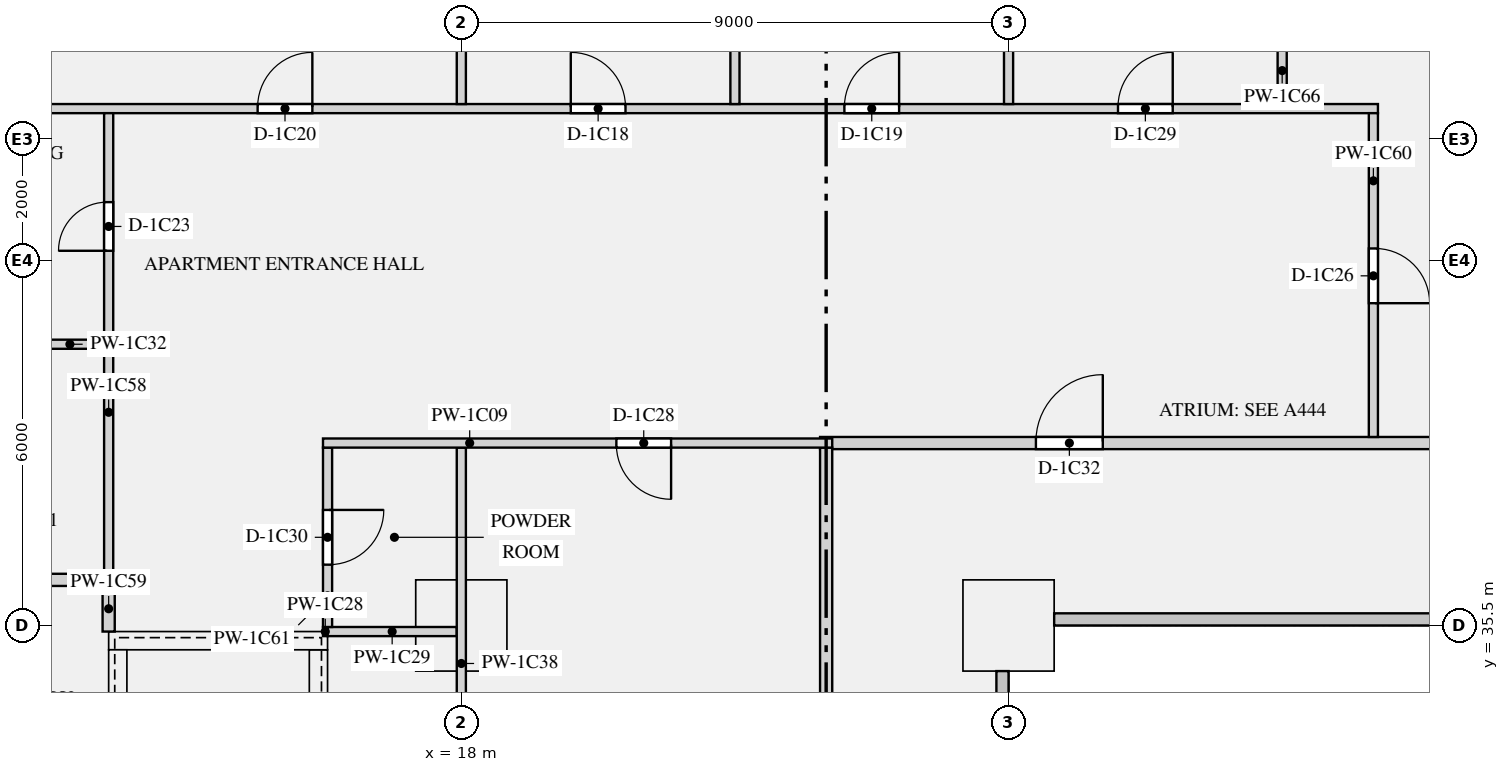
"""IFC4 building model, lengths in metres.
Left out: names, types, materials, properties, quantities, classifications, styles, units other than length and angle.
Written with IfcOpenShell. Run it as: python <this file> out.ifc"""

import sys

from ifc_helpers import new_model, si_unit, direction, frame, frame_2d, origin, origin_2d, place, context, subcontext, project, spatial, rectangle, extrude, element, fill, save


model = new_model("IFC4")
c1 = context("Model", 3, precision=1e-05, world=origin(), true_north=direction((0.0, 1.0)))
c2 = subcontext(c1, "Body", "Model", "MODEL_VIEW")
j1 = project(units=[si_unit("LENGTHUNIT", "METRE"), si_unit("PLANEANGLEUNIT", "RADIAN")], contexts=[c1])
p1 = place(None, origin())
s1 = spatial("IfcSite", under=j1, at=p1, CompositionType="ELEMENT")
p2 = place(p1, origin())
s2 = spatial("IfcBuilding", under=s1, at=p2, CompositionType="ELEMENT")
p3 = place(p2, frame((0.0, 0.0, 38.4)))
s3 = spatial("IfcBuildingStorey", under=s2, at=p3, CompositionType="ELEMENT", Elevation=38.4)
for number, where, z_axis, x_axis in (
    (1, (18.0, 35.5, 0.0), (0.0, 0.0, 1.0), (1.0, 0.0, 0.0)),
    (2, (27.0, 35.5, 0.0), (0.0, 0.0, 1.0), (1.0, 0.0, 0.0)),
):
    element("IfcColumn", number, at=place(p3, frame(where, z_axis=z_axis, x_axis=x_axis)), inside=s3, PredefinedType="COLUMN", context=c2, shape_type="SweptSolid", body=[
        extrude(rectangle(XDim=1.5, YDim=1.5, at=origin_2d()), origin(), (0.0, 0.0, 1.0), 3.15),
    ])
p4 = place(p3, frame((12.2, 35.25, 0.0), z_axis=(0.0, 0.0, 1.0), x_axis=(1.0, 0.0, 0.0)))
e3 = element("IfcWall", 3, at=p4, inside=s3, PredefinedType="SHEAR", context=c2, shape_type="SweptSolid", body=[
    extrude(rectangle(XDim=3.6, YDim=0.3, at=frame_2d((1.8, 0.0))), origin(), (0.0, 0.0, 1.0), 3.15),
])
for number, where, z_axis, x_axis in (
    (4, (12.35, 27.3, 0.0), (0.0, 0.0, 1.0), (0.0, 1.0, 0.0)),
    (5, (15.65, 27.3, 0.0), (0.0, 0.0, 1.0), (0.0, 1.0, 0.0)),
):
    element("IfcWall", number, at=place(p3, frame(where, z_axis=z_axis, x_axis=x_axis)), inside=s3, PredefinedType="SHEAR", context=c2, shape_type="SweptSolid", body=[
        extrude(rectangle(XDim=7.8, YDim=0.3, at=frame_2d((3.9, 0.0))), origin(), (0.0, 0.0, 1.0), 3.15),
    ])
p5 = place(p3, frame((15.725, 38.5, 0.0), z_axis=(0.0, 0.0, 1.0), x_axis=(1.0, 0.0, 0.0)))
e6 = element("IfcWall", 6, at=p5, inside=s3, PredefinedType="PARTITIONING", context=c2, shape_type="SweptSolid", body=[
    extrude(rectangle(XDim=8.375, YDim=0.15, at=frame_2d((4.188, 0.0))), origin(), (0.0, 0.0, 1.0), 2.83),
])
p6 = place(p5, frame((4.825, 0.0, 0.0)))
e7 = element("IfcOpeningElement", 7, at=p6, cuts=e6, PredefinedType="OPENING", context=c2, shape_type="SweptSolid", body=[
    extrude(rectangle(XDim=0.9, YDim=2.1, at=frame_2d((0.45, 1.05))), frame((0.0, 0.085, 0.0), z_axis=(0.0, -1.0, 0.0), x_axis=(1.0, 0.0, 0.0)), (0.0, 0.0, 1.0), 0.17),
])
p7 = place(p3, frame((23.9, 38.5, 0.0), z_axis=(0.0, 0.0, 1.0), x_axis=(1.0, 0.0, 0.0)))
e8 = element("IfcWall", 8, at=p7, inside=s3, PredefinedType="PARTITIONING", context=c2, shape_type="SweptSolid", body=[
    extrude(rectangle(XDim=24.2, YDim=0.2, at=frame_2d((12.1, 0.0))), origin(), (0.0, 0.0, 1.0), 2.83),
])
p8 = place(p7, frame((3.55, 0.0, 0.0)))
e9 = element("IfcOpeningElement", 9, at=p8, cuts=e8, PredefinedType="OPENING", context=c2, shape_type="SweptSolid", body=[
    extrude(rectangle(XDim=1.1, YDim=2.1, at=frame_2d((0.55, 1.05))), frame((0.0, 0.11, 0.0), z_axis=(0.0, -1.0, 0.0), x_axis=(1.0, 0.0, 0.0)), (0.0, 0.0, 1.0), 0.22),
])
p9 = place(p3, frame((0.8, 36.25, 0.0), z_axis=(0.0, 0.0, 1.0), x_axis=(1.0, 0.0, 0.0)))
e10 = element("IfcWall", 10, at=p9, inside=s3, PredefinedType="PARTITIONING", context=c2, shape_type="SweptSolid", body=[
    extrude(rectangle(XDim=11.475, YDim=0.2, at=frame_2d((5.737, 0.0))), origin(), (0.0, 0.0, 1.0), 2.83),
])
p10 = place(p3, frame((5.3, 44.0, 0.0), z_axis=(0.0, 0.0, 1.0), x_axis=(1.0, 0.0, 0.0)))
e11 = element("IfcWall", 11, at=p10, inside=s3, PredefinedType="PARTITIONING", context=c2, shape_type="SweptSolid", body=[
    extrude(rectangle(XDim=27.775, YDim=0.15, at=frame_2d((13.887, 0.0))), origin(), (0.0, 0.0, 1.0), 2.83),
])
p11 = place(p10, frame((14.5, 0.0, 0.0)))
e12 = element("IfcOpeningElement", 12, at=p11, cuts=e11, PredefinedType="OPENING", context=c2, shape_type="SweptSolid", body=[
    extrude(rectangle(XDim=0.9, YDim=2.1, at=frame_2d((0.45, 1.05))), frame((0.0, 0.085, 0.0), z_axis=(0.0, -1.0, 0.0), x_axis=(1.0, 0.0, 0.0)), (0.0, 0.0, 1.0), 0.17),
])
p12 = place(p10, frame((19.0, 0.0, 0.0)))
e13 = element("IfcOpeningElement", 13, at=p12, cuts=e11, PredefinedType="OPENING", context=c2, shape_type="SweptSolid", body=[
    extrude(rectangle(XDim=0.9, YDim=2.1, at=frame_2d((0.45, 1.05))), frame((0.0, 0.085, 0.0), z_axis=(0.0, -1.0, 0.0), x_axis=(1.0, 0.0, 0.0)), (0.0, 0.0, 1.0), 0.17),
])
p13 = place(p10, frame((9.35, 0.0, 0.0)))
e14 = element("IfcOpeningElement", 14, at=p13, cuts=e11, PredefinedType="OPENING", context=c2, shape_type="SweptSolid", body=[
    extrude(rectangle(XDim=0.9, YDim=2.1, at=frame_2d((0.45, 1.05))), frame((0.0, 0.085, 0.0), z_axis=(0.0, -1.0, 0.0), x_axis=(1.0, 0.0, 0.0)), (0.0, 0.0, 1.0), 0.17),
])
p14 = place(p10, frame((23.5, 0.0, 0.0)))
e15 = element("IfcOpeningElement", 15, at=p14, cuts=e11, PredefinedType="OPENING", context=c2, shape_type="SweptSolid", body=[
    extrude(rectangle(XDim=0.9, YDim=2.1, at=frame_2d((0.45, 1.05))), frame((0.0, 0.085, 0.0), z_axis=(0.0, -1.0, 0.0), x_axis=(1.0, 0.0, 0.0)), (0.0, 0.0, 1.0), 0.17),
])
p15 = place(p3, frame((15.725, 35.4, 0.0), z_axis=(0.0, 0.0, 1.0), x_axis=(1.0, 0.0, 0.0)))
e16 = element("IfcWall", 16, at=p15, inside=s3, PredefinedType="PARTITIONING", context=c2, shape_type="SweptSolid", body=[
    extrude(rectangle(XDim=0.075, YDim=0.15, at=frame_2d((0.038, 0.0))), origin(), (0.0, 0.0, 1.0), 2.83),
])
p16 = place(p3, frame((15.8, 35.4, 0.0), z_axis=(0.0, 0.0, 1.0), x_axis=(1.0, 0.0, 0.0)))
e17 = element("IfcWall", 17, at=p16, inside=s3, PredefinedType="PARTITIONING", context=c2, shape_type="SweptSolid", body=[
    extrude(rectangle(XDim=2.125, YDim=0.15, at=frame_2d((1.062, 0.0))), origin(), (0.0, 0.0, 1.0), 2.83),
])
p17 = place(p3, frame((9.075, 40.125, 0.0), z_axis=(0.0, 0.0, 1.0), x_axis=(1.0, 0.0, 0.0)))
e18 = element("IfcWall", 18, at=p17, inside=s3, PredefinedType="PARTITIONING", context=c2, shape_type="SweptSolid", body=[
    extrude(rectangle(XDim=3.05, YDim=0.15, at=frame_2d((1.525, 0.0))), origin(), (0.0, 0.0, 1.0), 2.83),
])
p18 = place(p17, frame((1.125, 0.0, 0.0)))
e19 = element("IfcOpeningElement", 19, at=p18, cuts=e18, PredefinedType="OPENING", context=c2, shape_type="SweptSolid", body=[
    extrude(rectangle(XDim=0.8, YDim=2.1, at=frame_2d((0.4, 1.05))), frame((0.0, 0.085, 0.0), z_axis=(0.0, -1.0, 0.0), x_axis=(1.0, 0.0, 0.0)), (0.0, 0.0, 1.0), 0.17),
])
p19 = place(p3, frame((18.0, 27.1, 0.0), z_axis=(0.0, 0.0, 1.0), x_axis=(0.0, 1.0, 0.0)))
e20 = element("IfcWall", 20, at=p19, inside=s3, PredefinedType="PARTITIONING", context=c2, shape_type="SweptSolid", body=[
    extrude(rectangle(XDim=11.325, YDim=0.15, at=frame_2d((5.663, 0.0))), origin(), (0.0, 0.0, 1.0), 2.83),
])
p20 = place(p19, frame((3.325, 0.0, 0.0)))
e21 = element("IfcOpeningElement", 21, at=p20, cuts=e20, PredefinedType="OPENING", context=c2, shape_type="SweptSolid", body=[
    extrude(rectangle(XDim=0.9, YDim=2.1, at=frame_2d((0.45, 1.05))), frame((0.0, 0.085, 0.0), z_axis=(0.0, -1.0, 0.0), x_axis=(1.0, 0.0, 0.0)), (0.0, 0.0, 1.0), 0.17),
])
p21 = place(p3, frame((18.0, 44.075, 0.0), z_axis=(0.0, 0.0, 1.0), x_axis=(0.0, 1.0, 0.0)))
e22 = element("IfcWall", 22, at=p21, inside=s3, PredefinedType="PARTITIONING", context=c2, shape_type="SweptSolid", body=[
    extrude(rectangle(XDim=3.625, YDim=0.15, at=frame_2d((1.812, 0.0))), origin(), (0.0, 0.0, 1.0), 2.83),
])
p22 = place(p3, frame((24.0, 27.1, 0.0), z_axis=(0.0, 0.0, 1.0), x_axis=(0.0, 1.0, 0.0)))
e23 = element("IfcWall", 23, at=p22, inside=s3, PredefinedType="PARTITIONING", context=c2, shape_type="SweptSolid", body=[
    extrude(rectangle(XDim=11.325, YDim=0.2, at=frame_2d((5.663, 0.0))), origin(), (0.0, 0.0, 1.0), 2.83),
])
p23 = place(p3, frame((12.2, 36.35, 0.0), z_axis=(0.0, 0.0, 1.0), x_axis=(0.0, 1.0, 0.0)))
e24 = element("IfcWall", 24, at=p23, inside=s3, PredefinedType="PARTITIONING", context=c2, shape_type="SweptSolid", body=[
    extrude(rectangle(XDim=7.575, YDim=0.15, at=frame_2d((3.788, 0.0))), origin(), (0.0, 0.0, 1.0), 2.83),
])
p24 = place(p23, frame((5.312, 0.0, 0.0)))
e25 = element("IfcOpeningElement", 25, at=p24, cuts=e24, PredefinedType="OPENING", context=c2, shape_type="SweptSolid", body=[
    extrude(rectangle(XDim=0.8, YDim=2.1, at=frame_2d((0.4, 1.05))), frame((0.0, 0.085, 0.0), z_axis=(0.0, -1.0, 0.0), x_axis=(1.0, 0.0, 0.0)), (0.0, 0.0, 1.0), 0.17),
])
p25 = place(p3, frame((12.2, 35.4, 0.0), z_axis=(0.0, 0.0, 1.0), x_axis=(0.0, 1.0, 0.0)))
e26 = element("IfcWall", 26, at=p25, inside=s3, PredefinedType="PARTITIONING", context=c2, shape_type="SweptSolid", body=[
    extrude(rectangle(XDim=0.75, YDim=0.2, at=frame_2d((0.375, 0.0))), origin(), (0.0, 0.0, 1.0), 2.83),
])
p26 = place(p3, frame((33.0, 38.6, 0.0), z_axis=(0.0, 0.0, 1.0), x_axis=(0.0, 1.0, 0.0)))
e27 = element("IfcWall", 27, at=p26, inside=s3, PredefinedType="PARTITIONING", context=c2, shape_type="SweptSolid", body=[
    extrude(rectangle(XDim=5.325, YDim=0.15, at=frame_2d((2.663, 0.0))), origin(), (0.0, 0.0, 1.0), 2.83),
])
p27 = place(p26, frame((2.2, 0.0, 0.0)))
e28 = element("IfcOpeningElement", 28, at=p27, cuts=e27, PredefinedType="OPENING", context=c2, shape_type="SweptSolid", body=[
    extrude(rectangle(XDim=0.9, YDim=2.1, at=frame_2d((0.45, 1.05))), frame((0.0, 0.085, 0.0), z_axis=(0.0, -1.0, 0.0), x_axis=(1.0, 0.0, 0.0)), (0.0, 0.0, 1.0), 0.17),
])
p28 = place(p3, frame((15.8, 35.475, 0.0), z_axis=(0.0, 0.0, 1.0), x_axis=(0.0, 1.0, 0.0)))
e29 = element("IfcWall", 29, at=p28, inside=s3, PredefinedType="PARTITIONING", context=c2, shape_type="SweptSolid", body=[
    extrude(rectangle(XDim=2.95, YDim=0.15, at=frame_2d((1.475, 0.0))), origin(), (0.0, 0.0, 1.0), 2.83),
])
p29 = place(p28, frame((1.025, 0.0, 0.0)))
e30 = element("IfcOpeningElement", 30, at=p29, cuts=e29, PredefinedType="OPENING", context=c2, shape_type="SweptSolid", body=[
    extrude(rectangle(XDim=0.9, YDim=2.1, at=frame_2d((0.45, 1.05))), frame((0.0, 0.085, 0.0), z_axis=(0.0, -1.0, 0.0), x_axis=(1.0, 0.0, 0.0)), (0.0, 0.0, 1.0), 0.17),
])
for number, where, z_axis, x_axis in (
    (31, (22.5, 44.075, 0.0), (0.0, 0.0, 1.0), (0.0, 1.0, 0.0)),
    (32, (27.0, 44.075, 0.0), (0.0, 0.0, 1.0), (0.0, 1.0, 0.0)),
):
    element("IfcWall", number, at=place(p3, frame(where, z_axis=z_axis, x_axis=x_axis)), inside=s3, PredefinedType="PARTITIONING", context=c2, shape_type="SweptSolid", body=[
        extrude(rectangle(XDim=3.625, YDim=0.15, at=frame_2d((1.812, 0.0))), origin(), (0.0, 0.0, 1.0), 2.83),
    ])
p30 = place(p3, frame((31.5, 44.075, 0.0), z_axis=(0.0, 0.0, 1.0), x_axis=(0.0, 1.0, 0.0)))
e33 = element("IfcWall", 33, at=p30, inside=s3, PredefinedType="PARTITIONING", context=c2, shape_type="SweptSolid", body=[
    extrude(rectangle(XDim=3.625, YDim=0.15, at=frame_2d((1.812, 0.0))), origin(), (0.0, 0.0, 1.0), 2.83),
])
p31 = place(p30, frame((1.1, 0.0, 0.0)))
e34 = element("IfcOpeningElement", 34, at=p31, cuts=e33, PredefinedType="OPENING", context=c2, shape_type="SweptSolid", body=[
    extrude(rectangle(XDim=1.5, YDim=2.1, at=frame_2d((0.75, 1.05))), frame((0.0, 0.085, 0.0), z_axis=(0.0, -1.0, 0.0), x_axis=(1.0, 0.0, 0.0)), (0.0, 0.0, 1.0), 0.17),
])
p32 = place(p11, origin())
e35 = element("IfcDoor", 35, at=p32, inside=s3, OperationType="SINGLE_SWING_LEFT", PredefinedType="DOOR", context=c2, shape_type="SweptSolid", body=[
    extrude(rectangle(XDim=0.9, YDim=2.1, at=frame_2d((0.45, 1.05))), frame((0.0, 0.025, 0.0), z_axis=(0.0, -1.0, 0.0), x_axis=(1.0, 0.0, 0.0)), (0.0, 0.0, 1.0), 0.05),
])
fill(e12, e35)
p33 = place(p12, origin())
e36 = element("IfcDoor", 36, at=p33, inside=s3, OperationType="SINGLE_SWING_RIGHT", PredefinedType="DOOR", context=c2, shape_type="SweptSolid", body=[
    extrude(rectangle(XDim=0.9, YDim=2.1, at=frame_2d((0.45, 1.05))), frame((0.0, 0.025, 0.0), z_axis=(0.0, -1.0, 0.0), x_axis=(1.0, 0.0, 0.0)), (0.0, 0.0, 1.0), 0.05),
])
fill(e13, e36)
p34 = place(p13, origin())
e37 = element("IfcDoor", 37, at=p34, inside=s3, OperationType="SINGLE_SWING_RIGHT", PredefinedType="DOOR", context=c2, shape_type="SweptSolid", body=[
    extrude(rectangle(XDim=0.9, YDim=2.1, at=frame_2d((0.45, 1.05))), frame((0.0, 0.025, 0.0), z_axis=(0.0, -1.0, 0.0), x_axis=(1.0, 0.0, 0.0)), (0.0, 0.0, 1.0), 0.05),
])
fill(e14, e37)
p35 = place(p24, origin())
e38 = element("IfcDoor", 38, at=p35, inside=s3, OperationType="SINGLE_SWING_LEFT", PredefinedType="DOOR", context=c2, shape_type="SweptSolid", body=[
    extrude(rectangle(XDim=0.8, YDim=2.1, at=frame_2d((0.4, 1.05))), frame((0.0, 0.025, 0.0), z_axis=(0.0, -1.0, 0.0), x_axis=(1.0, 0.0, 0.0)), (0.0, 0.0, 1.0), 0.05),
])
fill(e25, e38)
p36 = place(p27, frame((0.9, 0.0, 0.0), z_axis=(0.0, 0.0, 1.0), x_axis=(-1.0, 0.0, 0.0)))
e39 = element("IfcDoor", 39, at=p36, inside=s3, OperationType="SINGLE_SWING_RIGHT", PredefinedType="DOOR", context=c2, shape_type="SweptSolid", body=[
    extrude(rectangle(XDim=0.9, YDim=2.1, at=frame_2d((0.45, 1.05))), frame((0.0, 0.025, 0.0), z_axis=(0.0, -1.0, 0.0), x_axis=(1.0, 0.0, 0.0)), (0.0, 0.0, 1.0), 0.05),
])
fill(e28, e39)
p37 = place(p6, frame((0.9, 0.0, 0.0), z_axis=(0.0, 0.0, 1.0), x_axis=(-1.0, 0.0, 0.0)))
e40 = element("IfcDoor", 40, at=p37, inside=s3, OperationType="SINGLE_SWING_LEFT", PredefinedType="DOOR", context=c2, shape_type="SweptSolid", body=[
    extrude(rectangle(XDim=0.9, YDim=2.1, at=frame_2d((0.45, 1.05))), frame((0.0, 0.025, 0.0), z_axis=(0.0, -1.0, 0.0), x_axis=(1.0, 0.0, 0.0)), (0.0, 0.0, 1.0), 0.05),
])
fill(e7, e40)
p38 = place(p14, origin())
e41 = element("IfcDoor", 41, at=p38, inside=s3, OperationType="SINGLE_SWING_RIGHT", PredefinedType="DOOR", context=c2, shape_type="SweptSolid", body=[
    extrude(rectangle(XDim=0.9, YDim=2.1, at=frame_2d((0.45, 1.05))), frame((0.0, 0.025, 0.0), z_axis=(0.0, -1.0, 0.0), x_axis=(1.0, 0.0, 0.0)), (0.0, 0.0, 1.0), 0.05),
])
fill(e15, e41)
p39 = place(p29, frame((0.9, 0.0, 0.0), z_axis=(0.0, 0.0, 1.0), x_axis=(-1.0, 0.0, 0.0)))
e42 = element("IfcDoor", 42, at=p39, inside=s3, OperationType="SINGLE_SWING_LEFT", PredefinedType="DOOR", context=c2, shape_type="SweptSolid", body=[
    extrude(rectangle(XDim=0.9, YDim=2.1, at=frame_2d((0.45, 1.05))), frame((0.0, 0.025, 0.0), z_axis=(0.0, -1.0, 0.0), x_axis=(1.0, 0.0, 0.0)), (0.0, 0.0, 1.0), 0.05),
])
fill(e30, e42)
p40 = place(p8, origin())
e43 = element("IfcDoor", 43, at=p40, inside=s3, OperationType="SINGLE_SWING_RIGHT", PredefinedType="DOOR", context=c2, shape_type="SweptSolid", body=[
    extrude(rectangle(XDim=1.1, YDim=2.1, at=frame_2d((0.55, 1.05))), frame((0.0, 0.025, 0.0), z_axis=(0.0, -1.0, 0.0), x_axis=(1.0, 0.0, 0.0)), (0.0, 0.0, 1.0), 0.05),
])
fill(e9, e43)
save(model, sys.argv[1])
